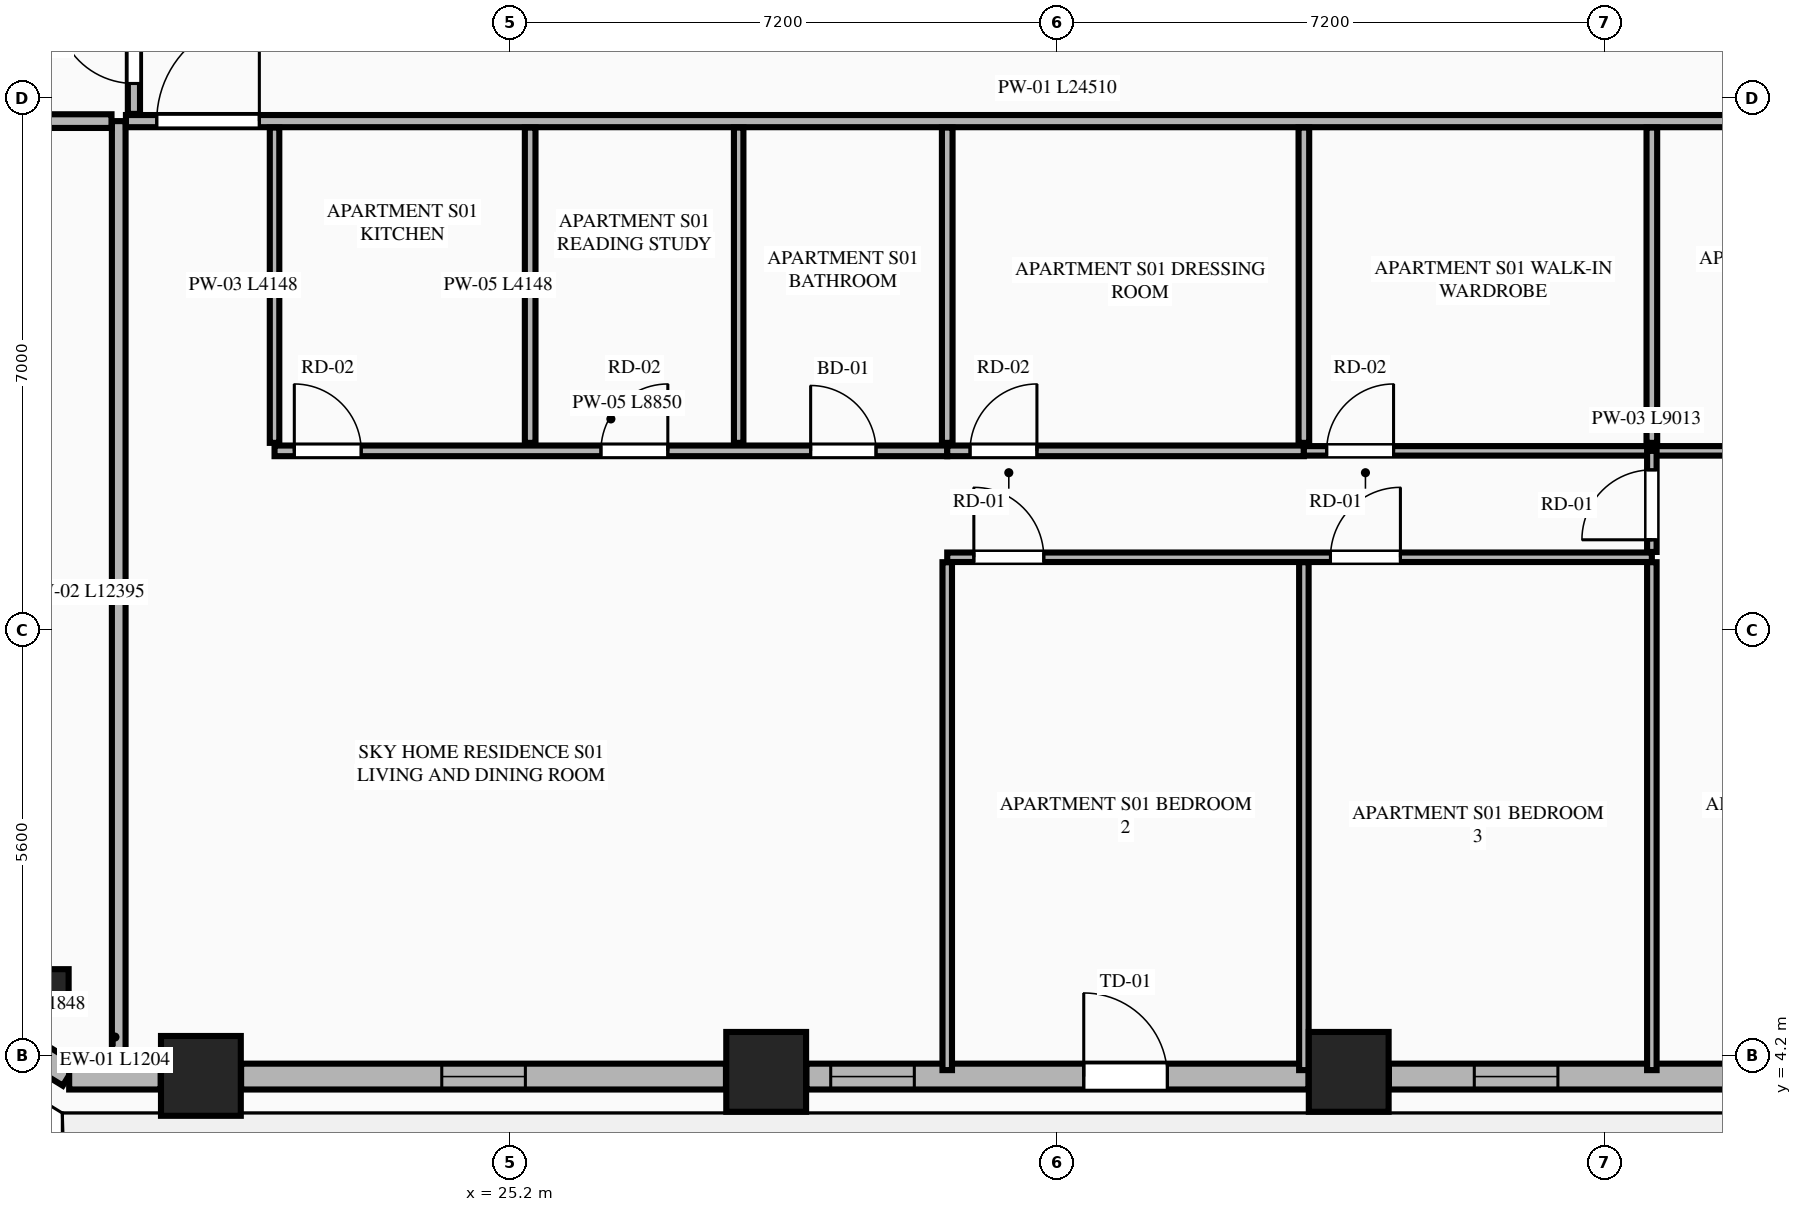
"""IFC4 building model, lengths in metres.
Left out: names, types, materials, properties, quantities, classifications, styles, units other than length and angle.
Written with IfcOpenShell. Run it as: python <this file> out.ifc"""

import sys

from ifc_helpers import new_model, si_unit, direction, frame, frame_2d, origin, origin_2d, place, context, subcontext, project, spatial, rectangle, extrude, element, fill, save


model = new_model("IFC4")
c1 = context("Model", 3, precision=1e-05, world=origin(), true_north=direction((0.0, 1.0)))
c2 = subcontext(c1, "Body", "Model", "MODEL_VIEW")
j1 = project(units=[si_unit("LENGTHUNIT", "METRE"), si_unit("PLANEANGLEUNIT", "RADIAN")], contexts=[c1])
p1 = place(None, origin())
s1 = spatial("IfcSite", under=j1, at=p1, CompositionType="ELEMENT")
p2 = place(p1, origin())
s2 = spatial("IfcBuilding", under=s1, at=p2, CompositionType="ELEMENT")
p3 = place(p2, frame((0.0, 0.0, 141.0)))
s3 = spatial("IfcBuildingStorey", under=s2, at=p3, CompositionType="ELEMENT", Elevation=141.0)
for number, where, z_axis, x_axis in (
    (1, (21.131, 3.939, 0.0), (0.0, 0.0, 1.0), (1.0, 0.0, 0.0)),
    (2, (28.568, 3.992, 0.0), (0.0, 0.0, 1.0), (1.0, 0.0, 0.0)),
    (3, (36.232, 3.992, 0.0), (0.0, 0.0, 1.0), (1.0, 0.0, 0.0)),
):
    element("IfcColumn", number, at=place(p3, frame(where, z_axis=z_axis, x_axis=x_axis)), inside=s3, PredefinedType="COLUMN", context=c2, shape_type="SweptSolid", body=[
        extrude(rectangle(XDim=1.05, YDim=1.05, at=origin_2d()), origin(), (0.0, 0.0, 1.0), 3.55),
    ])
p4 = place(p3, frame((19.141, 5.093, 0.0), z_axis=(0.0, 0.0, 1.0), x_axis=(0.865160173452, -0.501495637342, 0.0)))
e4 = element("IfcColumn", 4, at=p4, inside=s3, PredefinedType="PILASTER", context=c2, shape_type="SweptSolid", body=[
    extrude(rectangle(XDim=0.5, YDim=0.35, at=origin_2d()), origin(), (0.0, 0.0, 1.0), 3.55),
])
p5 = place(p3, frame((17.829, 4.923, 0.0), z_axis=(0.0, 0.0, 1.0), x_axis=(0.851798915137, -0.523868884523, 0.0)))
e5 = element("IfcWall", 5, at=p5, inside=s3, PredefinedType="STANDARD", context=c2, shape_type="SweptSolid", body=[
    extrude(rectangle(XDim=1.848, YDim=0.34, at=frame_2d((0.924, 0.0))), origin(), (0.0, 0.0, 1.0), 3.34),
])
p6 = place(p3, frame((19.398, 3.93, 0.0), z_axis=(0.0, 0.0, 1.0), x_axis=(1.0, 0.0, 0.0)))
e6 = element("IfcWall", 6, at=p6, inside=s3, PredefinedType="STANDARD", context=c2, shape_type="SweptSolid", body=[
    extrude(rectangle(XDim=1.204, YDim=0.34, at=frame_2d((0.602, 0.0))), origin(), (0.0, 0.0, 1.0), 3.34),
])
p7 = place(p3, frame((21.66, 3.93, 0.0), z_axis=(0.0, 0.0, 1.0), x_axis=(1.0, 0.0, 0.0)))
e7 = element("IfcWall", 7, at=p7, inside=s3, PredefinedType="STANDARD", context=c2, shape_type="SweptSolid", body=[
    extrude(rectangle(XDim=6.379, YDim=0.34, at=frame_2d((3.189, 0.0))), origin(), (0.0, 0.0, 1.0), 2.797),
])
p8 = place(p7, frame((2.64, 0.0, 0.75)))
e8 = element("IfcOpeningElement", 8, at=p8, cuts=e7, PredefinedType="OPENING", context=c2, shape_type="SweptSolid", body=[
    extrude(rectangle(XDim=1.1, YDim=1.897, at=frame_2d((0.55, 0.948))), frame((0.0, 0.18, 0.0), z_axis=(0.0, -1.0, 0.0), x_axis=(1.0, 0.0, 0.0)), (0.0, 0.0, 1.0), 0.36),
])
p9 = place(p3, frame((29.097, 3.93, 0.0), z_axis=(0.0, 0.0, 1.0), x_axis=(1.0, 0.0, 0.0)))
e9 = element("IfcWall", 9, at=p9, inside=s3, PredefinedType="STANDARD", context=c2, shape_type="SweptSolid", body=[
    extrude(rectangle(XDim=6.606, YDim=0.34, at=frame_2d((3.303, 0.0))), origin(), (0.0, 0.0, 1.0), 2.797),
])
p10 = place(p9, frame((3.649, 0.0, 0.0)))
e10 = element("IfcOpeningElement", 10, at=p10, cuts=e9, PredefinedType="OPENING", context=c2, shape_type="SweptSolid", body=[
    extrude(rectangle(XDim=1.1, YDim=2.25, at=frame_2d((0.55, 1.125))), frame((0.0, 0.18, 0.0), z_axis=(0.0, -1.0, 0.0), x_axis=(1.0, 0.0, 0.0)), (0.0, 0.0, 1.0), 0.36),
])
p11 = place(p9, frame((0.32, 0.0, 0.75)))
e11 = element("IfcOpeningElement", 11, at=p11, cuts=e9, PredefinedType="OPENING", context=c2, shape_type="SweptSolid", body=[
    extrude(rectangle(XDim=1.1, YDim=1.897, at=frame_2d((0.55, 0.948))), frame((0.0, 0.18, 0.0), z_axis=(0.0, -1.0, 0.0), x_axis=(1.0, 0.0, 0.0)), (0.0, 0.0, 1.0), 0.36),
])
p12 = place(p3, frame((36.761, 3.93, 0.0), z_axis=(0.0, 0.0, 1.0), x_axis=(1.0, 0.0, 0.0)))
e12 = element("IfcWall", 12, at=p12, inside=s3, PredefinedType="STANDARD", context=c2, shape_type="SweptSolid", body=[
    extrude(rectangle(XDim=6.379, YDim=0.34, at=frame_2d((3.189, 0.0))), origin(), (0.0, 0.0, 1.0), 2.797),
])
p13 = place(p12, frame((1.123, 0.0, 0.75)))
e13 = element("IfcOpeningElement", 13, at=p13, cuts=e12, PredefinedType="OPENING", context=c2, shape_type="SweptSolid", body=[
    extrude(rectangle(XDim=1.1, YDim=1.897, at=frame_2d((0.55, 0.948))), frame((0.0, 0.18, 0.0), z_axis=(0.0, -1.0, 0.0), x_axis=(1.0, 0.0, 0.0)), (0.0, 0.0, 1.0), 0.36),
])
p14 = place(p12, frame((4.425, 0.0, 0.75)))
e14 = element("IfcOpeningElement", 14, at=p14, cuts=e12, PredefinedType="OPENING", context=c2, shape_type="SweptSolid", body=[
    extrude(rectangle(XDim=1.1, YDim=1.897, at=frame_2d((0.55, 0.948))), frame((0.0, 0.18, 0.0), z_axis=(0.0, -1.0, 0.0), x_axis=(1.0, 0.0, 0.0)), (0.0, 0.0, 1.0), 0.36),
])
p15 = place(p3, frame((20.05, 4.105, 0.0), z_axis=(0.0, 0.0, 1.0), x_axis=(0.0, 1.0, 0.0)))
e15 = element("IfcWall", 15, at=p15, inside=s3, PredefinedType="PARTITIONING", context=c2, shape_type="SweptSolid", body=[
    extrude(rectangle(XDim=12.395, YDim=0.18, at=frame_2d((6.198, 0.0))), origin(), (0.0, 0.0, 1.0), 3.34),
])
p16 = place(p3, frame((20.145, 16.5, 0.0), z_axis=(0.0, 0.0, 1.0), x_axis=(1.0, 0.0, 0.0)))
e16 = element("IfcWall", 16, at=p16, inside=s3, PredefinedType="PARTITIONING", context=c2, shape_type="SweptSolid", body=[
    extrude(rectangle(XDim=24.51, YDim=0.16, at=frame_2d((12.255, 0.0))), origin(), (0.0, 0.0, 1.0), 3.34),
])
p17 = place(p16, frame((0.405, 0.0, 0.0)))
e17 = element("IfcOpeningElement", 17, at=p17, cuts=e16, PredefinedType="OPENING", context=c2, shape_type="SweptSolid", body=[
    extrude(rectangle(XDim=1.35, YDim=2.35, at=frame_2d((0.675, 1.175))), frame((0.0, 0.09, 0.0), z_axis=(0.0, -1.0, 0.0), x_axis=(1.0, 0.0, 0.0)), (0.0, 0.0, 1.0), 0.18),
])
p18 = place(p3, frame((22.1, 12.267, 0.0), z_axis=(0.0, 0.0, 1.0), x_axis=(0.0, 1.0, 0.0)))
e18 = element("IfcWall", 18, at=p18, inside=s3, PredefinedType="PARTITIONING", context=c2, shape_type="SweptSolid", body=[
    extrude(rectangle(XDim=4.148, YDim=0.125, at=frame_2d((2.074, 0.0))), origin(), (0.0, 0.0, 1.0), 2.722),
])
p19 = place(p3, frame((22.1, 12.162, 0.0), z_axis=(0.0, 0.0, 1.0), x_axis=(1.0, 0.0, 0.0)))
e19 = element("IfcWall", 19, at=p19, inside=s3, PredefinedType="PLUMBINGWALL", context=c2, shape_type="SweptSolid", body=[
    extrude(rectangle(XDim=8.85, YDim=0.14, at=frame_2d((4.425, 0.0))), origin(), (0.0, 0.0, 1.0), 3.34),
])
p20 = place(p19, frame((7.053, 0.0, 0.0)))
e20 = element("IfcOpeningElement", 20, at=p20, cuts=e19, PredefinedType="OPENING", context=c2, shape_type="SweptSolid", body=[
    extrude(rectangle(XDim=0.86, YDim=2.1, at=frame_2d((0.43, 1.05))), frame((0.0, 0.08, 0.0), z_axis=(0.0, -1.0, 0.0), x_axis=(1.0, 0.0, 0.0)), (0.0, 0.0, 1.0), 0.16),
])
p21 = place(p19, frame((0.26, 0.0, 0.0)))
e21 = element("IfcOpeningElement", 21, at=p21, cuts=e19, PredefinedType="OPENING", context=c2, shape_type="SweptSolid", body=[
    extrude(rectangle(XDim=0.88, YDim=2.15, at=frame_2d((0.44, 1.075))), frame((0.0, 0.08, 0.0), z_axis=(0.0, -1.0, 0.0), x_axis=(1.0, 0.0, 0.0)), (0.0, 0.0, 1.0), 0.16),
])
p22 = place(p19, frame((4.294, 0.0, 0.0)))
e22 = element("IfcOpeningElement", 22, at=p22, cuts=e19, PredefinedType="OPENING", context=c2, shape_type="SweptSolid", body=[
    extrude(rectangle(XDim=0.88, YDim=2.15, at=frame_2d((0.44, 1.075))), frame((0.0, 0.08, 0.0), z_axis=(0.0, -1.0, 0.0), x_axis=(1.0, 0.0, 0.0)), (0.0, 0.0, 1.0), 0.16),
])
p23 = place(p3, frame((30.95, 12.162, 0.0), z_axis=(0.0, 0.0, 1.0), x_axis=(1.0, 0.0, 0.0)))
e23 = element("IfcWall", 23, at=p23, inside=s3, PredefinedType="PLUMBINGWALL", context=c2, shape_type="SweptSolid", body=[
    extrude(rectangle(XDim=4.692, YDim=0.14, at=frame_2d((2.346, 0.0))), origin(), (0.0, 0.0, 1.0), 3.34),
])
p24 = place(p23, frame((0.3, 0.0, 0.0)))
e24 = element("IfcOpeningElement", 24, at=p24, cuts=e23, PredefinedType="OPENING", context=c2, shape_type="SweptSolid", body=[
    extrude(rectangle(XDim=0.88, YDim=2.15, at=frame_2d((0.44, 1.075))), frame((0.0, 0.08, 0.0), z_axis=(0.0, -1.0, 0.0), x_axis=(1.0, 0.0, 0.0)), (0.0, 0.0, 1.0), 0.16),
])
p25 = place(p3, frame((35.642, 12.162, 0.0), z_axis=(0.0, 0.0, 1.0), x_axis=(1.0, 0.0, 0.0)))
e25 = element("IfcWall", 25, at=p25, inside=s3, PredefinedType="PARTITIONING", context=c2, shape_type="SweptSolid", body=[
    extrude(rectangle(XDim=9.013, YDim=0.125, at=frame_2d((4.506, 0.0))), origin(), (0.0, 0.0, 1.0), 3.34),
])
p26 = place(p25, frame((6.37, 0.0, 0.0)))
e26 = element("IfcOpeningElement", 26, at=p26, cuts=e25, PredefinedType="OPENING", context=c2, shape_type="SweptSolid", body=[
    extrude(rectangle(XDim=0.86, YDim=2.1, at=frame_2d((0.43, 1.05))), frame((0.0, 0.073, 0.0), z_axis=(0.0, -1.0, 0.0), x_axis=(1.0, 0.0, 0.0)), (0.0, 0.0, 1.0), 0.145),
])
p27 = place(p25, frame((0.3, 0.0, 0.0)))
e27 = element("IfcOpeningElement", 27, at=p27, cuts=e25, PredefinedType="OPENING", context=c2, shape_type="SweptSolid", body=[
    extrude(rectangle(XDim=0.88, YDim=2.15, at=frame_2d((0.44, 1.075))), frame((0.0, 0.073, 0.0), z_axis=(0.0, -1.0, 0.0), x_axis=(1.0, 0.0, 0.0)), (0.0, 0.0, 1.0), 0.145),
])
p28 = place(p3, frame((25.463, 12.267, 0.0), z_axis=(0.0, 0.0, 1.0), x_axis=(0.0, 1.0, 0.0)))
e28 = element("IfcWall", 28, at=p28, inside=s3, PredefinedType="PLUMBINGWALL", context=c2, shape_type="SweptSolid", body=[
    extrude(rectangle(XDim=4.148, YDim=0.14, at=frame_2d((2.074, 0.0))), origin(), (0.0, 0.0, 1.0), 3.34),
])
p29 = place(p3, frame((28.206, 12.267, 0.0), z_axis=(0.0, 0.0, 1.0), x_axis=(0.0, 1.0, 0.0)))
e29 = element("IfcWall", 29, at=p29, inside=s3, PredefinedType="PARTITIONING", context=c2, shape_type="SweptSolid", body=[
    extrude(rectangle(XDim=4.148, YDim=0.125, at=frame_2d((2.074, 0.0))), origin(), (0.0, 0.0, 1.0), 3.34),
])
p30 = place(p3, frame((30.95, 4.015, 0.0), z_axis=(0.0, 0.0, 1.0), x_axis=(0.0, 1.0, 0.0)))
e30 = element("IfcWall", 30, at=p30, inside=s3, PredefinedType="PARTITIONING", context=c2, shape_type="SweptSolid", body=[
    extrude(rectangle(XDim=6.682, YDim=0.125, at=frame_2d((3.341, 0.0))), origin(), (0.0, 0.0, 1.0), 3.34),
])
p31 = place(p3, frame((30.95, 10.762, 0.0), z_axis=(0.0, 0.0, 1.0), x_axis=(1.0, 0.0, 0.0)))
e31 = element("IfcWall", 31, at=p31, inside=s3, PredefinedType="PARTITIONING", context=c2, shape_type="SweptSolid", body=[
    extrude(rectangle(XDim=9.27, YDim=0.125, at=frame_2d((4.635, 0.0))), origin(), (0.0, 0.0, 1.0), 3.34),
])
p32 = place(p31, frame((0.35, 0.0, 0.0)))
e32 = element("IfcOpeningElement", 32, at=p32, cuts=e31, PredefinedType="OPENING", context=c2, shape_type="SweptSolid", body=[
    extrude(rectangle(XDim=0.92, YDim=2.15, at=frame_2d((0.46, 1.075))), frame((0.0, 0.073, 0.0), z_axis=(0.0, -1.0, 0.0), x_axis=(1.0, 0.0, 0.0)), (0.0, 0.0, 1.0), 0.145),
])
p33 = place(p31, frame((5.042, 0.0, 0.0)))
e33 = element("IfcOpeningElement", 33, at=p33, cuts=e31, PredefinedType="OPENING", context=c2, shape_type="SweptSolid", body=[
    extrude(rectangle(XDim=0.92, YDim=2.15, at=frame_2d((0.46, 1.075))), frame((0.0, 0.073, 0.0), z_axis=(0.0, -1.0, 0.0), x_axis=(1.0, 0.0, 0.0)), (0.0, 0.0, 1.0), 0.145),
])
p34 = place(p3, frame((40.22, 10.832, 0.0), z_axis=(0.0, 0.0, 1.0), x_axis=(0.0, 1.0, 0.0)))
e34 = element("IfcWall", 34, at=p34, inside=s3, PredefinedType="PARTITIONING", context=c2, shape_type="SweptSolid", body=[
    extrude(rectangle(XDim=1.33, YDim=0.125, at=frame_2d((0.665, 0.0))), origin(), (0.0, 0.0, 1.0), 3.34),
])
p35 = place(p34, frame((0.16, 0.0, 0.0)))
e35 = element("IfcOpeningElement", 35, at=p35, cuts=e34, PredefinedType="OPENING", context=c2, shape_type="SweptSolid", body=[
    extrude(rectangle(XDim=0.92, YDim=2.15, at=frame_2d((0.46, 1.075))), frame((0.0, 0.073, 0.0), z_axis=(0.0, -1.0, 0.0), x_axis=(1.0, 0.0, 0.0)), (0.0, 0.0, 1.0), 0.145),
])
for number, where, z_axis, x_axis in (
    (36, (30.95, 12.267, 0.0), (0.0, 0.0, 1.0), (0.0, 1.0, 0.0)),
    (37, (35.642, 12.267, 0.0), (0.0, 0.0, 1.0), (0.0, 1.0, 0.0)),
):
    element("IfcWall", number, at=place(p3, frame(where, z_axis=z_axis, x_axis=x_axis)), inside=s3, PredefinedType="PLUMBINGWALL", context=c2, shape_type="SweptSolid", body=[
        extrude(rectangle(XDim=4.148, YDim=0.14, at=frame_2d((2.074, 0.0))), origin(), (0.0, 0.0, 1.0), 3.34),
    ])
for number, where, z_axis, x_axis in (
    (38, (35.642, 4.015, 0.0), (0.0, 0.0, 1.0), (0.0, 1.0, 0.0)),
    (39, (40.22, 4.015, 0.0), (0.0, 0.0, 1.0), (0.0, 1.0, 0.0)),
):
    element("IfcWall", number, at=place(p3, frame(where, z_axis=z_axis, x_axis=x_axis)), inside=s3, PredefinedType="PARTITIONING", context=c2, shape_type="SweptSolid", body=[
        extrude(rectangle(XDim=6.682, YDim=0.125, at=frame_2d((3.341, 0.0))), origin(), (0.0, 0.0, 1.0), 3.34),
    ])
p36 = place(p3, frame((40.22, 12.267, 0.0), z_axis=(0.0, 0.0, 1.0), x_axis=(0.0, 1.0, 0.0)))
e40 = element("IfcWall", 40, at=p36, inside=s3, PredefinedType="PLUMBINGWALL", context=c2, shape_type="SweptSolid", body=[
    extrude(rectangle(XDim=4.148, YDim=0.14, at=frame_2d((2.074, 0.0))), origin(), (0.0, 0.0, 1.0), 3.34),
])
p37 = place(p3, frame((12.185, 16.5, 0.0), z_axis=(0.0, 0.0, 1.0), x_axis=(1.0, 0.0, 0.0)))
e41 = element("IfcWall", 41, at=p37, inside=s3, PredefinedType="PARTITIONING", context=c2, shape_type="SweptSolid", body=[
    extrude(rectangle(XDim=7.77, YDim=0.18, at=frame_2d((3.885, 0.0))), origin(), (0.0, 0.0, 1.0), 3.34),
])
p38 = place(p3, frame((20.25, 16.595, 0.0), z_axis=(0.0, 0.0, 1.0), x_axis=(0.0, 1.0, 0.0)))
e42 = element("IfcWall", 42, at=p38, inside=s3, PredefinedType="PARTITIONING", context=c2, shape_type="SweptSolid", body=[
    extrude(rectangle(XDim=7.706, YDim=0.16, at=frame_2d((3.853, 0.0))), origin(), (0.0, 0.0, 1.0), 3.34),
])
p39 = place(p38, frame((0.4, 0.0, 0.0)))
e43 = element("IfcOpeningElement", 43, at=p39, cuts=e42, PredefinedType="OPENING", context=c2, shape_type="SweptSolid", body=[
    extrude(rectangle(XDim=1.02, YDim=2.25, at=frame_2d((0.51, 1.125))), frame((0.0, 0.09, 0.0), z_axis=(0.0, -1.0, 0.0), x_axis=(1.0, 0.0, 0.0)), (0.0, 0.0, 1.0), 0.18),
])
p40 = place(p8, origin())
e44 = element("IfcWindow", 44, at=p40, inside=s3, PartitioningType="SINGLE_PANEL", PredefinedType="WINDOW", context=c2, shape_type="SweptSolid", body=[
    extrude(rectangle(XDim=1.1, YDim=1.897, at=frame_2d((0.55, 0.948))), frame((0.0, 0.03, 0.0), z_axis=(0.0, -1.0, 0.0), x_axis=(1.0, 0.0, 0.0)), (0.0, 0.0, 1.0), 0.06),
])
fill(e8, e44)
p41 = place(p10, origin())
e45 = element("IfcDoor", 45, at=p41, inside=s3, OperationType="SINGLE_SWING_LEFT", PredefinedType="DOOR", context=c2, shape_type="SweptSolid", body=[
    extrude(rectangle(XDim=1.1, YDim=2.25, at=frame_2d((0.55, 1.125))), frame((0.0, 0.025, 0.0), z_axis=(0.0, -1.0, 0.0), x_axis=(1.0, 0.0, 0.0)), (0.0, 0.0, 1.0), 0.05),
])
fill(e10, e45)
p42 = place(p13, origin())
e46 = element("IfcWindow", 46, at=p42, inside=s3, PartitioningType="SINGLE_PANEL", PredefinedType="WINDOW", context=c2, shape_type="SweptSolid", body=[
    extrude(rectangle(XDim=1.1, YDim=1.897, at=frame_2d((0.55, 0.948))), frame((0.0, 0.03, 0.0), z_axis=(0.0, -1.0, 0.0), x_axis=(1.0, 0.0, 0.0)), (0.0, 0.0, 1.0), 0.06),
])
fill(e13, e46)
p43 = place(p20, origin())
e47 = element("IfcDoor", 47, at=p43, inside=s3, OperationType="SINGLE_SWING_LEFT", PredefinedType="DOOR", context=c2, shape_type="SweptSolid", body=[
    extrude(rectangle(XDim=0.86, YDim=2.1, at=frame_2d((0.43, 1.05))), frame((0.0, 0.025, 0.0), z_axis=(0.0, -1.0, 0.0), x_axis=(1.0, 0.0, 0.0)), (0.0, 0.0, 1.0), 0.05),
])
fill(e20, e47)
p44 = place(p17, origin())
e48 = element("IfcDoor", 48, at=p44, inside=s3, OperationType="SINGLE_SWING_RIGHT", PredefinedType="DOOR", context=c2, shape_type="SweptSolid", body=[
    extrude(rectangle(XDim=1.35, YDim=2.35, at=frame_2d((0.675, 1.175))), frame((0.0, 0.025, 0.0), z_axis=(0.0, -1.0, 0.0), x_axis=(1.0, 0.0, 0.0)), (0.0, 0.0, 1.0), 0.05),
])
fill(e17, e48)
p45 = place(p21, origin())
e49 = element("IfcDoor", 49, at=p45, inside=s3, OperationType="SINGLE_SWING_LEFT", PredefinedType="DOOR", context=c2, shape_type="SweptSolid", body=[
    extrude(rectangle(XDim=0.88, YDim=2.15, at=frame_2d((0.44, 1.075))), frame((0.0, 0.025, 0.0), z_axis=(0.0, -1.0, 0.0), x_axis=(1.0, 0.0, 0.0)), (0.0, 0.0, 1.0), 0.05),
])
fill(e21, e49)
p46 = place(p22, origin())
e50 = element("IfcDoor", 50, at=p46, inside=s3, OperationType="SINGLE_SWING_RIGHT", PredefinedType="DOOR", context=c2, shape_type="SweptSolid", body=[
    extrude(rectangle(XDim=0.88, YDim=2.15, at=frame_2d((0.44, 1.075))), frame((0.0, 0.025, 0.0), z_axis=(0.0, -1.0, 0.0), x_axis=(1.0, 0.0, 0.0)), (0.0, 0.0, 1.0), 0.05),
])
fill(e22, e50)
p47 = place(p24, origin())
e51 = element("IfcDoor", 51, at=p47, inside=s3, OperationType="SINGLE_SWING_RIGHT", PredefinedType="DOOR", context=c2, shape_type="SweptSolid", body=[
    extrude(rectangle(XDim=0.88, YDim=2.15, at=frame_2d((0.44, 1.075))), frame((0.0, 0.025, 0.0), z_axis=(0.0, -1.0, 0.0), x_axis=(1.0, 0.0, 0.0)), (0.0, 0.0, 1.0), 0.05),
])
fill(e24, e51)
p48 = place(p32, origin())
e52 = element("IfcDoor", 52, at=p48, inside=s3, OperationType="SINGLE_SWING_LEFT", PredefinedType="DOOR", context=c2, shape_type="SweptSolid", body=[
    extrude(rectangle(XDim=0.92, YDim=2.15, at=frame_2d((0.46, 1.075))), frame((0.0, 0.025, 0.0), z_axis=(0.0, -1.0, 0.0), x_axis=(1.0, 0.0, 0.0)), (0.0, 0.0, 1.0), 0.05),
])
fill(e32, e52)
p49 = place(p33, origin())
e53 = element("IfcDoor", 53, at=p49, inside=s3, OperationType="SINGLE_SWING_RIGHT", PredefinedType="DOOR", context=c2, shape_type="SweptSolid", body=[
    extrude(rectangle(XDim=0.92, YDim=2.15, at=frame_2d((0.46, 1.075))), frame((0.0, 0.025, 0.0), z_axis=(0.0, -1.0, 0.0), x_axis=(1.0, 0.0, 0.0)), (0.0, 0.0, 1.0), 0.05),
])
fill(e33, e53)
p50 = place(p35, origin())
e54 = element("IfcDoor", 54, at=p50, inside=s3, OperationType="SINGLE_SWING_LEFT", PredefinedType="DOOR", context=c2, shape_type="SweptSolid", body=[
    extrude(rectangle(XDim=0.92, YDim=2.15, at=frame_2d((0.46, 1.075))), frame((0.0, 0.025, 0.0), z_axis=(0.0, -1.0, 0.0), x_axis=(1.0, 0.0, 0.0)), (0.0, 0.0, 1.0), 0.05),
])
fill(e35, e54)
p51 = place(p27, origin())
e55 = element("IfcDoor", 55, at=p51, inside=s3, OperationType="SINGLE_SWING_RIGHT", PredefinedType="DOOR", context=c2, shape_type="SweptSolid", body=[
    extrude(rectangle(XDim=0.88, YDim=2.15, at=frame_2d((0.44, 1.075))), frame((0.0, 0.025, 0.0), z_axis=(0.0, -1.0, 0.0), x_axis=(1.0, 0.0, 0.0)), (0.0, 0.0, 1.0), 0.05),
])
fill(e27, e55)
p52 = place(p39, origin())
e56 = element("IfcDoor", 56, at=p52, inside=s3, OperationType="SINGLE_SWING_RIGHT", PredefinedType="DOOR", context=c2, shape_type="SweptSolid", body=[
    extrude(rectangle(XDim=1.02, YDim=2.25, at=frame_2d((0.51, 1.125))), frame((0.0, 0.025, 0.0), z_axis=(0.0, -1.0, 0.0), x_axis=(1.0, 0.0, 0.0)), (0.0, 0.0, 1.0), 0.05),
])
fill(e43, e56)
p53 = place(p11, origin())
e57 = element("IfcWindow", 57, at=p53, inside=s3, PartitioningType="SINGLE_PANEL", PredefinedType="WINDOW", context=c2, shape_type="SweptSolid", body=[
    extrude(rectangle(XDim=1.1, YDim=1.897, at=frame_2d((0.55, 0.948))), frame((0.0, 0.03, 0.0), z_axis=(0.0, -1.0, 0.0), x_axis=(1.0, 0.0, 0.0)), (0.0, 0.0, 1.0), 0.06),
])
fill(e11, e57)
save(model, sys.argv[1])
